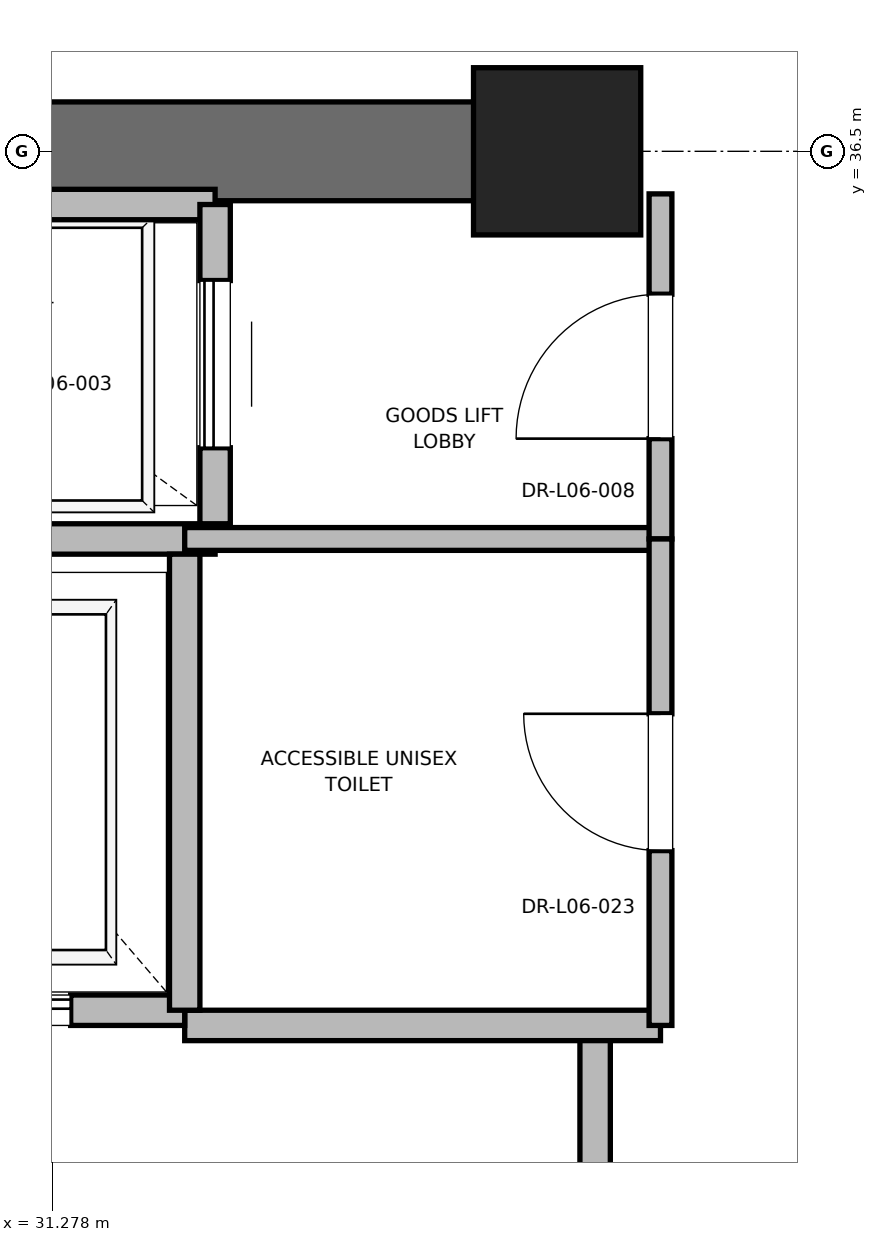
"""IFC4 building model, lengths in metres.
Left out: names, types, materials, properties, quantities, classifications, styles, units other than length and angle.
Written with IfcOpenShell. Run it as: python <this file> out.ifc"""

import sys

from ifc_helpers import new_model, si_unit, direction, frame, frame_2d, origin, origin_2d, place, context, subcontext, project, spatial, rectangle, extrude, element, fill, save


model = new_model("IFC4")
c1 = context("Model", 3, precision=1e-05, world=origin(), true_north=direction((0.0, 1.0)))
c2 = subcontext(c1, "Body", "Model", "MODEL_VIEW")
j1 = project(units=[si_unit("LENGTHUNIT", "METRE"), si_unit("PLANEANGLEUNIT", "RADIAN")], contexts=[c1])
p1 = place(None, origin())
s1 = spatial("IfcSite", under=j1, at=p1, CompositionType="ELEMENT")
p2 = place(p1, origin())
s2 = spatial("IfcBuilding", under=s1, at=p2, CompositionType="ELEMENT")
p3 = place(p2, frame((0.0, 0.0, 31.6)))
s3 = spatial("IfcBuildingStorey", under=s2, at=p3, CompositionType="ELEMENT", Elevation=31.6)
p4 = place(p3, frame((34.6, 36.5, 0.0), z_axis=(0.0, 0.0, 1.0), x_axis=(1.0, 0.0, 0.0)))
e1 = element("IfcColumn", 1, at=p4, inside=s3, PredefinedType="PILASTER", context=c2, shape_type="SweptSolid", body=[
    extrude(rectangle(XDim=1.1, YDim=1.1, at=origin_2d()), origin(), (0.0, 0.0, 1.0), 4.0),
])
p5 = place(p3, frame((29.0, 36.5, 0.0), z_axis=(0.0, 0.0, 1.0), x_axis=(1.0, 0.0, 0.0)))
e2 = element("IfcWall", 2, at=p5, inside=s3, PredefinedType="SHEAR", context=c2, shape_type="SweptSolid", body=[
    extrude(rectangle(XDim=5.8, YDim=0.65, at=frame_2d((2.9, 0.0))), origin(), (0.0, 0.0, 1.0), 3.76),
])
p6 = place(p3, frame((34.85, 27.38, 0.0), z_axis=(0.0, 0.0, 1.0), x_axis=(0.0, 1.0, 0.0)))
e3 = element("IfcWall", 3, at=p6, inside=s3, PredefinedType="PARTITIONING", context=c2, shape_type="SweptSolid", body=[
    extrude(rectangle(XDim=3.37, YDim=0.2, at=frame_2d((1.685, 0.0))), origin(), (0.0, 0.0, 1.0), 3.76),
])
p7 = place(p6, frame((1.11, 0.0, 0.0)))
e4 = element("IfcOpeningElement", 4, at=p7, cuts=e3, PredefinedType="OPENING", context=c2, shape_type="SweptSolid", body=[
    extrude(rectangle(XDim=1.15, YDim=2.2, at=frame_2d((0.575, 1.1))), frame((0.0, 0.1, 0.0), z_axis=(0.0, -1.0, 0.0), x_axis=(1.0, 0.0, 0.0)), (0.0, 0.0, 1.0), 0.2),
])
p8 = place(p3, frame((32.15, 30.75, 0.0), z_axis=(0.0, 0.0, 1.0), x_axis=(1.0, 0.0, 0.0)))
e5 = element("IfcWall", 5, at=p8, inside=s3, PredefinedType="PARTITIONING", context=c2, shape_type="SweptSolid", body=[
    extrude(rectangle(XDim=3.13, YDim=0.2, at=frame_2d((1.565, 0.0))), origin(), (0.0, 0.0, 1.0), 3.76),
])
p9 = place(p3, frame((29.55, 30.85, 0.0), z_axis=(0.0, 0.0, 1.0), x_axis=(1.0, 0.0, 0.0)))
e6 = element("IfcWall", 6, at=p9, inside=s3, PredefinedType="SOLIDWALL", context=c2, shape_type="SweptSolid", body=[
    extrude(rectangle(XDim=2.6, YDim=0.2, at=frame_2d((1.3, 0.0))), origin(), (0.0, 0.0, 1.0), 2.54),
])
p10 = place(p9, frame((0.75, 0.0, 0.0)))
e7 = element("IfcOpeningElement", 7, at=p10, cuts=e6, PredefinedType="OPENING", context=c2, shape_type="SweptSolid", body=[
    extrude(rectangle(XDim=1.1, YDim=2.2, at=frame_2d((0.55, 1.1))), frame((0.0, 0.1, 0.0), z_axis=(0.0, -1.0, 0.0), x_axis=(1.0, 0.0, 0.0)), (0.0, 0.0, 1.0), 0.2),
])
p11 = place(p3, frame((29.55, 33.95, 0.0), z_axis=(0.0, 0.0, 1.0), x_axis=(1.0, 0.0, 0.0)))
e8 = element("IfcWall", 8, at=p11, inside=s3, PredefinedType="SOLIDWALL", context=c2, shape_type="SweptSolid", body=[
    extrude(rectangle(XDim=2.8, YDim=0.2, at=frame_2d((1.4, 0.0))), origin(), (0.0, 0.0, 1.0), 3.76),
])
p12 = place(p3, frame((32.15, 30.85, 0.0), z_axis=(0.0, 0.0, 1.0), x_axis=(0.0, 1.0, 0.0)))
e9 = element("IfcWall", 9, at=p12, inside=s3, PredefinedType="SOLIDWALL", context=c2, shape_type="SweptSolid", body=[
    extrude(rectangle(XDim=3.0, YDim=0.2, at=frame_2d((1.5, 0.0))), origin(), (0.0, 0.0, 1.0), 3.76),
])
p13 = place(p3, frame((32.35, 36.15, 0.0), z_axis=(0.0, 0.0, 1.0), x_axis=(-1.0, 0.0, 0.0)))
e10 = element("IfcWall", 10, at=p13, inside=s3, PredefinedType="SOLIDWALL", context=c2, shape_type="SweptSolid", body=[
    extrude(rectangle(XDim=2.8, YDim=0.2, at=frame_2d((1.4, 0.0))), origin(), (0.0, 0.0, 1.0), 2.889),
])
p14 = place(p3, frame((32.35, 34.05, 0.0), z_axis=(0.0, 0.0, 1.0), x_axis=(0.0, 1.0, 0.0)))
e11 = element("IfcWall", 11, at=p14, inside=s3, PredefinedType="SOLIDWALL", context=c2, shape_type="SweptSolid", body=[
    extrude(rectangle(XDim=2.1, YDim=0.2, at=frame_2d((1.05, 0.0))), origin(), (0.0, 0.0, 1.0), 3.76),
])
p15 = place(p14, frame((0.5, 0.0, 0.0)))
e12 = element("IfcOpeningElement", 12, at=p15, cuts=e11, PredefinedType="OPENING", context=c2, shape_type="SweptSolid", body=[
    extrude(rectangle(XDim=1.1, YDim=2.2, at=frame_2d((0.55, 1.1))), frame((0.0, 0.1, 0.0), z_axis=(0.0, -1.0, 0.0), x_axis=(1.0, 0.0, 0.0)), (0.0, 0.0, 1.0), 0.2),
])
p16 = place(p3, frame((32.15, 33.95, 0.0), z_axis=(0.0, 0.0, 1.0), x_axis=(1.0, 0.0, 0.0)))
e13 = element("IfcWall", 13, at=p16, inside=s3, PredefinedType="PARTITIONING", context=c2, shape_type="SweptSolid", body=[
    extrude(rectangle(XDim=3.13, YDim=0.15, at=frame_2d((1.565, 0.0))), origin(), (0.0, 0.0, 1.0), 2.85),
])
p17 = place(p3, frame((35.28, 33.95, 0.0), z_axis=(0.0, 0.0, 1.0), x_axis=(0.0, 1.0, 0.0)))
e14 = element("IfcWall", 14, at=p17, inside=s3, PredefinedType="PARTITIONING", context=c2, shape_type="SweptSolid", body=[
    extrude(rectangle(XDim=2.27, YDim=0.15, at=frame_2d((1.135, 0.0))), origin(), (0.0, 0.0, 1.0), 2.54),
])
p18 = place(p17, frame((0.66, 0.0, 0.0)))
e15 = element("IfcOpeningElement", 15, at=p18, cuts=e14, PredefinedType="OPENING", context=c2, shape_type="SweptSolid", body=[
    extrude(rectangle(XDim=0.95, YDim=2.15, at=frame_2d((0.475, 1.075))), frame((0.0, 0.075, 0.0), z_axis=(0.0, -1.0, 0.0), x_axis=(1.0, 0.0, 0.0)), (0.0, 0.0, 1.0), 0.15),
])
p19 = place(p3, frame((35.28, 30.75, 0.0), z_axis=(0.0, 0.0, 1.0), x_axis=(0.0, 1.0, 0.0)))
e16 = element("IfcWall", 16, at=p19, inside=s3, PredefinedType="PARTITIONING", context=c2, shape_type="SweptSolid", body=[
    extrude(rectangle(XDim=3.2, YDim=0.15, at=frame_2d((1.6, 0.0))), origin(), (0.0, 0.0, 1.0), 2.85),
])
p20 = place(p19, frame((1.15, 0.0, 0.0)))
e17 = element("IfcOpeningElement", 17, at=p20, cuts=e16, PredefinedType="OPENING", context=c2, shape_type="SweptSolid", body=[
    extrude(rectangle(XDim=0.9, YDim=2.1, at=frame_2d((0.45, 1.05))), frame((0.0, 0.075, 0.0), z_axis=(0.0, -1.0, 0.0), x_axis=(1.0, 0.0, 0.0)), (0.0, 0.0, 1.0), 0.15),
])
p21 = place(p10, origin())
e18 = element("IfcDoor", 18, at=p21, inside=s3, OperationType="SLIDING_TO_RIGHT", PredefinedType="DOOR", context=c2, shape_type="SweptSolid", body=[
    extrude(rectangle(XDim=1.1, YDim=2.2, at=frame_2d((0.55, 1.1))), frame((0.0, 0.025, 0.0), z_axis=(0.0, -1.0, 0.0), x_axis=(1.0, 0.0, 0.0)), (0.0, 0.0, 1.0), 0.05),
])
fill(e7, e18)
p22 = place(p15, origin())
e19 = element("IfcDoor", 19, at=p22, inside=s3, OperationType="SLIDING_TO_RIGHT", PredefinedType="DOOR", context=c2, shape_type="SweptSolid", body=[
    extrude(rectangle(XDim=1.1, YDim=2.2, at=frame_2d((0.55, 1.1))), frame((0.0, 0.025, 0.0), z_axis=(0.0, -1.0, 0.0), x_axis=(1.0, 0.0, 0.0)), (0.0, 0.0, 1.0), 0.05),
])
fill(e12, e19)
p23 = place(p18, origin())
e20 = element("IfcDoor", 20, at=p23, inside=s3, OperationType="SINGLE_SWING_LEFT", PredefinedType="DOOR", context=c2, shape_type="SweptSolid", body=[
    extrude(rectangle(XDim=0.95, YDim=2.15, at=frame_2d((0.475, 1.075))), frame((0.0, 0.025, 0.0), z_axis=(0.0, -1.0, 0.0), x_axis=(1.0, 0.0, 0.0)), (0.0, 0.0, 1.0), 0.05),
])
fill(e15, e20)
p24 = place(p20, origin())
e21 = element("IfcDoor", 21, at=p24, inside=s3, OperationType="SINGLE_SWING_RIGHT", PredefinedType="DOOR", context=c2, shape_type="SweptSolid", body=[
    extrude(rectangle(XDim=0.9, YDim=2.1, at=frame_2d((0.45, 1.05))), frame((0.0, 0.025, 0.0), z_axis=(0.0, -1.0, 0.0), x_axis=(1.0, 0.0, 0.0)), (0.0, 0.0, 1.0), 0.05),
])
fill(e17, e21)
save(model, sys.argv[1])
